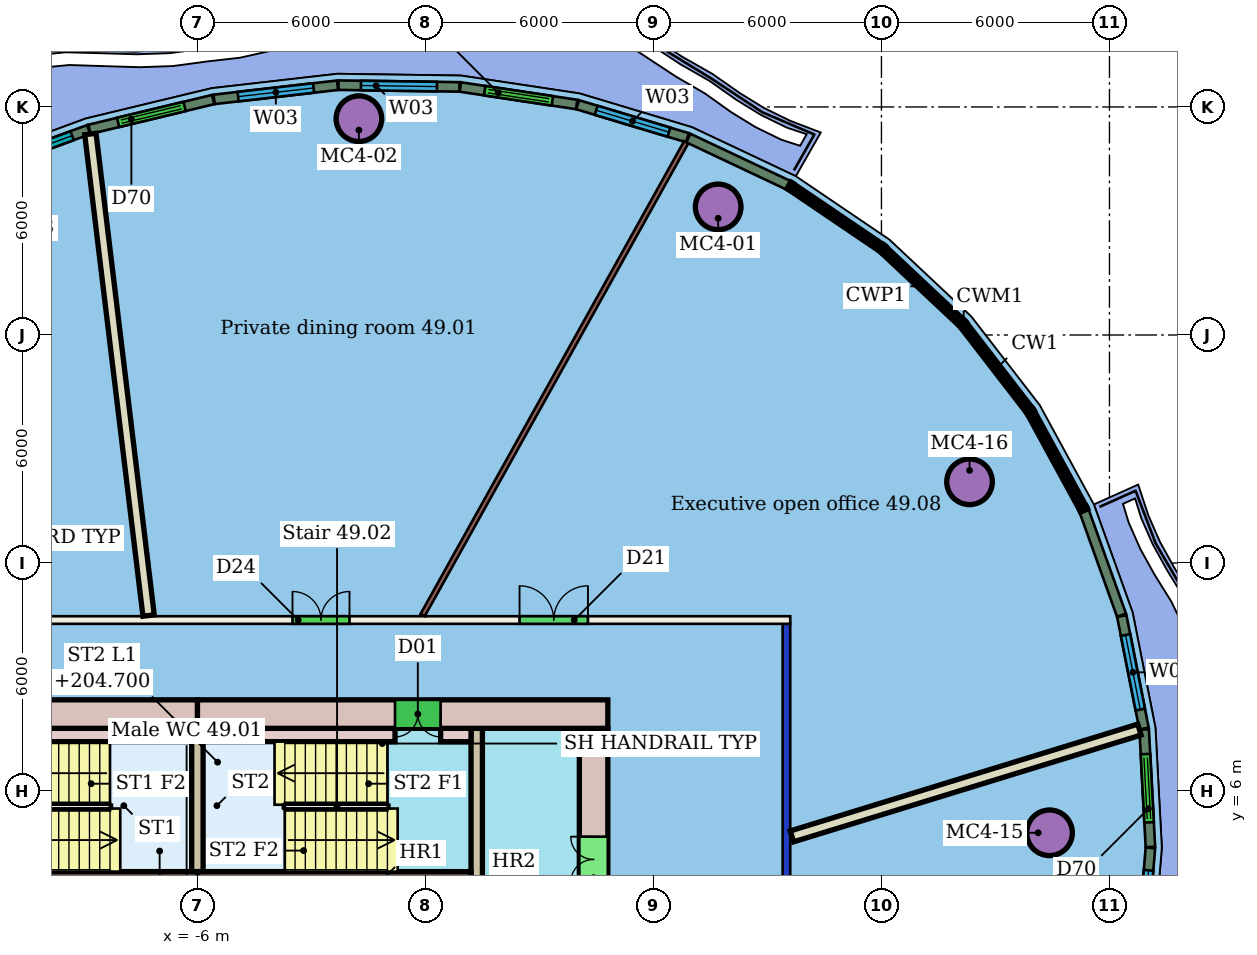
"""IFC4 building model, lengths in metres.
Left out: names, types, materials, properties, quantities, classifications, styles, units other than length and angle.
Written with IfcOpenShell. Run it as: python <this file> out.ifc"""

import sys

from ifc_helpers import new_model, si_unit, direction, frame, frame_2d, origin, origin_2d, place, context, subcontext, project, spatial, rectangle, hollow_circle, extrude, element, fill, save


model = new_model("IFC4")
c1 = context("Model", 3, precision=1e-05, world=origin(), true_north=direction((0.0, 1.0)))
c2 = subcontext(c1, "Body", "Model", "MODEL_VIEW")
j1 = project(units=[si_unit("LENGTHUNIT", "METRE"), si_unit("PLANEANGLEUNIT", "RADIAN")], contexts=[c1])
p1 = place(None, origin())
s1 = spatial("IfcSite", under=j1, at=p1, CompositionType="ELEMENT")
p2 = place(p1, origin())
s2 = spatial("IfcBuilding", under=s1, at=p2, CompositionType="ELEMENT")
p3 = place(p2, frame((0.0, 0.0, 202.9)))
s3 = spatial("IfcBuildingStorey", under=s2, at=p3, CompositionType="ELEMENT", Elevation=202.9)
for number, where, z_axis, x_axis in (
    (1, (7.704, 21.37, 0.0), (0.0, 0.0, 1.0), (1.0, 0.0, 0.0)),
    (2, (-1.75, 23.691, 0.0), (0.0, 0.0, 1.0), (1.0, 0.0, 0.0)),
    (3, (16.424, 4.901, 0.0), (0.0, 0.0, 1.0), (1.0, 0.0, 0.0)),
    (4, (14.318, 14.137, 0.0), (0.0, 0.0, 1.0), (1.0, 0.0, 0.0)),
):
    element("IfcColumn", number, at=place(p3, frame(where, z_axis=z_axis, x_axis=x_axis)), inside=s3, PredefinedType="COLUMN", context=c2, shape_type="SweptSolid", body=[
        extrude(hollow_circle(Radius=0.6, WallThickness=0.045, at=origin_2d()), origin(), (0.0, 0.0, 1.0), 3.45),
    ])
p4 = place(p3, frame((-21.6, 10.5, 0.0), z_axis=(0.0, 0.0, 1.0), x_axis=(1.0, 0.0, 0.0)))
e5 = element("IfcWall", 5, at=p4, inside=s3, PredefinedType="PARTITIONING", context=c2, shape_type="SweptSolid", body=[
    extrude(rectangle(XDim=31.2, YDim=0.2, at=frame_2d((15.6, 0.0))), origin(), (0.0, 0.0, 1.0), 3.45),
])
p5 = place(p4, frame((18.102, 0.0, 0.0)))
e6 = element("IfcOpeningElement", 6, at=p5, cuts=e5, PredefinedType="OPENING", context=c2, shape_type="SweptSolid", body=[
    extrude(rectangle(XDim=1.5, YDim=2.1, at=frame_2d((0.75, 1.05))), frame((0.0, 0.11, 0.0), z_axis=(0.0, -1.0, 0.0), x_axis=(1.0, 0.0, 0.0)), (0.0, 0.0, 1.0), 0.22),
])
p6 = place(p4, frame((8.563, 0.0, 0.0)))
e7 = element("IfcOpeningElement", 7, at=p6, cuts=e5, PredefinedType="OPENING", context=c2, shape_type="SweptSolid", body=[
    extrude(rectangle(XDim=1.8, YDim=2.4, at=frame_2d((0.9, 1.2))), frame((0.0, 0.11, 0.0), z_axis=(0.0, -1.0, 0.0), x_axis=(1.0, 0.0, 0.0)), (0.0, 0.0, 1.0), 0.22),
])
p7 = place(p4, frame((24.077, 0.0, 0.0)))
e8 = element("IfcOpeningElement", 8, at=p7, cuts=e5, PredefinedType="OPENING", context=c2, shape_type="SweptSolid", body=[
    extrude(rectangle(XDim=1.8, YDim=2.1, at=frame_2d((0.9, 1.05))), frame((0.0, 0.11, 0.0), z_axis=(0.0, -1.0, 0.0), x_axis=(1.0, 0.0, 0.0)), (0.0, 0.0, 1.0), 0.22),
])
p8 = place(p3, frame((9.5, 10.4, 0.0), z_axis=(0.0, 0.0, 1.0), x_axis=(0.0, -1.0, 0.0)))
e9 = element("IfcWall", 9, at=p8, inside=s3, PredefinedType="PARTITIONING", context=c2, shape_type="SweptSolid", body=[
    extrude(rectangle(XDim=20.8, YDim=0.2, at=frame_2d((10.4, 0.0))), origin(), (0.0, 0.0, 1.0), 3.05),
])
p9 = place(p8, frame((9.885, 0.0, 0.0)))
e10 = element("IfcOpeningElement", 10, at=p9, cuts=e9, PredefinedType="OPENING", context=c2, shape_type="SweptSolid", body=[
    extrude(rectangle(XDim=1.8, YDim=2.4, at=frame_2d((0.9, 1.2))), frame((0.0, 0.11, 0.0), z_axis=(0.0, -1.0, 0.0), x_axis=(1.0, 0.0, 0.0)), (0.0, 0.0, 1.0), 0.22),
])
p10 = place(p3, frame((6.863, 23.071, 0.0), z_axis=(0.0, 0.0, 1.0), x_axis=(-0.486953657805, -0.873427807635, 0.0)))
e11 = element("IfcWall", 11, at=p10, inside=s3, PredefinedType="PARTITIONING", context=c2, shape_type="SweptSolid", body=[
    extrude(rectangle(XDim=14.243, YDim=0.125, at=frame_2d((7.122, 0.0))), origin(), (0.0, 0.0, 1.0), 3.45),
])
p11 = place(p3, frame((-8.816, 23.289, 0.0), z_axis=(0.0, 0.0, 1.0), x_axis=(0.120069156686, -0.992765530029, 0.0)))
e12 = element("IfcWall", 12, at=p11, inside=s3, PredefinedType="PARTITIONING", context=c2, shape_type="SweptSolid", body=[
    extrude(rectangle(XDim=12.763, YDim=0.3, at=frame_2d((6.382, 0.0))), origin(), (0.0, 0.0, 1.0), 3.45),
])
p12 = place(p3, frame((18.788, 7.617, 0.0), z_axis=(0.0, 0.0, 1.0), x_axis=(-0.955883790435, -0.293745092188, 0.0)))
e13 = element("IfcWall", 13, at=p12, inside=s3, PredefinedType="PARTITIONING", context=c2, shape_type="SweptSolid", body=[
    extrude(rectangle(XDim=9.566, YDim=0.3, at=frame_2d((4.783, 0.0))), origin(), (0.0, 0.0, 1.0), 3.45),
])
p13 = place(p3, frame((9.549, 21.941, 0.0), z_axis=(0.0, 0.0, 1.0), x_axis=(-0.904371073682, 0.426746952054, 0.0)))
e14 = element("IfcWall", 14, at=p13, inside=s3, PredefinedType="SOLIDWALL", context=c2, shape_type="SweptSolid", body=[
    extrude(rectangle(XDim=2.908, YDim=0.25, at=frame_2d((1.454, 0.0))), origin(), (0.0, 0.0, 1.0), 3.1),
])
p14 = place(p3, frame((6.895, 23.191, 0.0), z_axis=(0.0, 0.0, 1.0), x_axis=(-0.957728205686, 0.287674614859, 0.0)))
e15 = element("IfcWall", 15, at=p14, inside=s3, PredefinedType="SOLIDWALL", context=c2, shape_type="SweptSolid", body=[
    extrude(rectangle(XDim=3.016, YDim=0.25, at=frame_2d((1.508, 0.0))), origin(), (0.0, 0.0, 1.0), 3.1),
])
p15 = place(p14, frame((0.508, 0.0, 0.9)))
e16 = element("IfcOpeningElement", 16, at=p15, cuts=e15, PredefinedType="OPENING", context=c2, shape_type="SweptSolid", body=[
    extrude(rectangle(XDim=2.0, YDim=2.1, at=frame_2d((1.0, 1.05))), frame((0.0, 0.135, 0.0), z_axis=(0.0, -1.0, 0.0), x_axis=(1.0, 0.0, 0.0)), (0.0, 0.0, 1.0), 0.27),
])
p16 = place(p3, frame((3.981, 24.065, 0.0), z_axis=(0.0, 0.0, 1.0), x_axis=(-0.988853480543, 0.148891887014, 0.0)))
e17 = element("IfcWall", 17, at=p16, inside=s3, PredefinedType="SOLIDWALL", context=c2, shape_type="SweptSolid", body=[
    extrude(rectangle(XDim=3.096, YDim=0.25, at=frame_2d((1.548, 0.0))), origin(), (0.0, 0.0, 1.0), 3.1),
])
p17 = place(p16, frame((0.648, 0.0, 0.0)))
e18 = element("IfcOpeningElement", 18, at=p17, cuts=e17, PredefinedType="OPENING", context=c2, shape_type="SweptSolid", body=[
    extrude(rectangle(XDim=1.8, YDim=2.4, at=frame_2d((0.9, 1.2))), frame((0.0, 0.135, 0.0), z_axis=(0.0, -1.0, 0.0), x_axis=(1.0, 0.0, 0.0)), (0.0, 0.0, 1.0), 0.27),
])
p18 = place(p3, frame((0.895, 24.528, 0.0), z_axis=(0.0, 0.0, 1.0), x_axis=(-0.999898209439, 0.014267822551, 0.0)))
e19 = element("IfcWall", 19, at=p18, inside=s3, PredefinedType="SOLIDWALL", context=c2, shape_type="SweptSolid", body=[
    extrude(rectangle(XDim=3.183, YDim=0.25, at=frame_2d((1.591, 0.0))), origin(), (0.0, 0.0, 1.0), 3.1),
])
p19 = place(p18, frame((0.591, 0.0, 0.9)))
e20 = element("IfcOpeningElement", 20, at=p19, cuts=e19, PredefinedType="OPENING", context=c2, shape_type="SweptSolid", body=[
    extrude(rectangle(XDim=2.0, YDim=2.1, at=frame_2d((1.0, 1.05))), frame((0.0, 0.135, 0.0), z_axis=(0.0, -1.0, 0.0), x_axis=(1.0, 0.0, 0.0)), (0.0, 0.0, 1.0), 0.27),
])
p20 = place(p3, frame((-2.312, 24.572, 0.0), z_axis=(0.0, 0.0, 1.0), x_axis=(-0.99349628186, -0.113864559585, 0.0)))
e21 = element("IfcWall", 21, at=p20, inside=s3, PredefinedType="SOLIDWALL", context=c2, shape_type="SweptSolid", body=[
    extrude(rectangle(XDim=3.27, YDim=0.25, at=frame_2d((1.635, 0.0))), origin(), (0.0, 0.0, 1.0), 3.1),
])
p21 = place(p20, frame((0.635, 0.0, 0.9)))
e22 = element("IfcOpeningElement", 22, at=p21, cuts=e21, PredefinedType="OPENING", context=c2, shape_type="SweptSolid", body=[
    extrude(rectangle(XDim=2.0, YDim=2.1, at=frame_2d((1.0, 1.05))), frame((0.0, 0.135, 0.0), z_axis=(0.0, -1.0, 0.0), x_axis=(1.0, 0.0, 0.0)), (0.0, 0.0, 1.0), 0.27),
])
p22 = place(p3, frame((-5.583, 24.196, 0.0), z_axis=(0.0, 0.0, 1.0), x_axis=(-0.972213814668, -0.234094635926, 0.0)))
e23 = element("IfcWall", 23, at=p22, inside=s3, PredefinedType="SOLIDWALL", context=c2, shape_type="SweptSolid", body=[
    extrude(rectangle(XDim=3.352, YDim=0.25, at=frame_2d((1.676, 0.0))), origin(), (0.0, 0.0, 1.0), 3.1),
])
p23 = place(p22, frame((0.776, 0.0, 0.0)))
e24 = element("IfcOpeningElement", 24, at=p23, cuts=e23, PredefinedType="OPENING", context=c2, shape_type="SweptSolid", body=[
    extrude(rectangle(XDim=1.8, YDim=2.4, at=frame_2d((0.9, 1.2))), frame((0.0, 0.135, 0.0), z_axis=(0.0, -1.0, 0.0), x_axis=(1.0, 0.0, 0.0)), (0.0, 0.0, 1.0), 0.27),
])
p24 = place(p3, frame((-8.863, 23.404, 0.0), z_axis=(0.0, 0.0, 1.0), x_axis=(-0.93828100614, -0.345873898288, 0.0)))
e25 = element("IfcWall", 25, at=p24, inside=s3, PredefinedType="SOLIDWALL", context=c2, shape_type="SweptSolid", body=[
    extrude(rectangle(XDim=3.423, YDim=0.25, at=frame_2d((1.712, 0.0))), origin(), (0.0, 0.0, 1.0), 3.1),
])
p25 = place(p24, frame((0.462, 0.0, 0.9)))
e26 = element("IfcOpeningElement", 26, at=p25, cuts=e25, PredefinedType="OPENING", context=c2, shape_type="SweptSolid", body=[
    extrude(rectangle(XDim=1.6, YDim=2.1, at=frame_2d((0.8, 1.05))), frame((0.0, 0.135, 0.0), z_axis=(0.0, -1.0, 0.0), x_axis=(1.0, 0.0, 0.0)), (0.0, 0.0, 1.0), 0.27),
])
p26 = place(p3, frame((18.816, 1.331, 0.0), z_axis=(0.0, 0.0, 1.0), x_axis=(0.082004278311, 0.996631977381, 0.0)))
e27 = element("IfcWall", 27, at=p26, inside=s3, PredefinedType="SOLIDWALL", context=c2, shape_type="SweptSolid", body=[
    extrude(rectangle(XDim=3.183, YDim=0.25, at=frame_2d((1.591, 0.0))), origin(), (0.0, 0.0, 1.0), 3.1),
])
p27 = place(p26, frame((0.591, 0.0, 0.9)))
e28 = element("IfcOpeningElement", 28, at=p27, cuts=e27, PredefinedType="OPENING", context=c2, shape_type="SweptSolid", body=[
    extrude(rectangle(XDim=2.0, YDim=2.1, at=frame_2d((1.0, 1.05))), frame((0.0, 0.135, 0.0), z_axis=(0.0, -1.0, 0.0), x_axis=(1.0, 0.0, 0.0)), (0.0, 0.0, 1.0), 0.27),
])
p28 = place(p3, frame((19.078, 4.528, 0.0), z_axis=(0.0, 0.0, 1.0), x_axis=(-0.053150699104, 0.998586502605, 0.0)))
e29 = element("IfcWall", 29, at=p28, inside=s3, PredefinedType="SOLIDWALL", context=c2, shape_type="SweptSolid", body=[
    extrude(rectangle(XDim=3.096, YDim=0.25, at=frame_2d((1.548, 0.0))), origin(), (0.0, 0.0, 1.0), 3.1),
])
p29 = place(p28, frame((0.648, 0.0, 0.0)))
e30 = element("IfcOpeningElement", 30, at=p29, cuts=e29, PredefinedType="OPENING", context=c2, shape_type="SweptSolid", body=[
    extrude(rectangle(XDim=1.8, YDim=2.4, at=frame_2d((0.9, 1.2))), frame((0.0, 0.135, 0.0), z_axis=(0.0, -1.0, 0.0), x_axis=(1.0, 0.0, 0.0)), (0.0, 0.0, 1.0), 0.27),
])
p30 = place(p3, frame((18.91, 7.645, 0.0), z_axis=(0.0, 0.0, 1.0), x_axis=(-0.194200963519, 0.980961765702, 0.0)))
e31 = element("IfcWall", 31, at=p30, inside=s3, PredefinedType="SOLIDWALL", context=c2, shape_type="SweptSolid", body=[
    extrude(rectangle(XDim=3.016, YDim=0.25, at=frame_2d((1.508, 0.0))), origin(), (0.0, 0.0, 1.0), 3.1),
])
p31 = place(p30, frame((0.508, 0.0, 0.9)))
e32 = element("IfcOpeningElement", 32, at=p31, cuts=e31, PredefinedType="OPENING", context=c2, shape_type="SweptSolid", body=[
    extrude(rectangle(XDim=2.0, YDim=2.1, at=frame_2d((1.0, 1.05))), frame((0.0, 0.135, 0.0), z_axis=(0.0, -1.0, 0.0), x_axis=(1.0, 0.0, 0.0)), (0.0, 0.0, 1.0), 0.27),
])
p32 = place(p3, frame((18.317, 10.629, 0.0), z_axis=(0.0, 0.0, 1.0), x_axis=(-0.337681671404, 0.941260372478, 0.0)))
e33 = element("IfcWall", 33, at=p32, inside=s3, PredefinedType="SOLIDWALL", context=c2, shape_type="SweptSolid", body=[
    extrude(rectangle(XDim=2.908, YDim=0.25, at=frame_2d((1.454, 0.0))), origin(), (0.0, 0.0, 1.0), 3.1),
])
p33 = place(p3, frame((4.8, 8.025, 0.0), z_axis=(0.0, 0.0, 1.0), x_axis=(-1.0, 0.0, 0.0)))
e34 = element("IfcWall", 34, at=p33, inside=s3, PredefinedType="SHEAR", context=c2, shape_type="SweptSolid", body=[
    extrude(rectangle(XDim=10.8, YDim=0.75, at=frame_2d((5.4, 0.0))), origin(), (0.0, 0.0, 1.0), 3.3),
])
p34 = place(p33, frame((4.4, 0.0, 0.0)))
e35 = element("IfcOpeningElement", 35, at=p34, cuts=e34, PredefinedType="OPENING", context=c2, shape_type="SweptSolid", body=[
    extrude(rectangle(XDim=1.2, YDim=2.1, at=frame_2d((0.6, 1.05))), frame((0.0, 0.385, 0.0), z_axis=(0.0, -1.0, 0.0), x_axis=(1.0, 0.0, 0.0)), (0.0, 0.0, 1.0), 0.77),
])
p35 = place(p3, frame((-6.0, 8.025, 0.0), z_axis=(0.0, 0.0, 1.0), x_axis=(-1.0, 0.0, 0.0)))
e36 = element("IfcWall", 36, at=p35, inside=s3, PredefinedType="SHEAR", context=c2, shape_type="SweptSolid", body=[
    extrude(rectangle(XDim=10.8, YDim=0.75, at=frame_2d((5.4, 0.0))), origin(), (0.0, 0.0, 1.0), 3.3),
])
p36 = place(p35, frame((5.2, 0.0, 0.0)))
e37 = element("IfcOpeningElement", 37, at=p36, cuts=e36, PredefinedType="OPENING", context=c2, shape_type="SweptSolid", body=[
    extrude(rectangle(XDim=1.2, YDim=2.1, at=frame_2d((0.6, 1.05))), frame((0.0, 0.385, 0.0), z_axis=(0.0, -1.0, 0.0), x_axis=(1.0, 0.0, 0.0)), (0.0, 0.0, 1.0), 0.77),
])
p37 = place(p3, frame((4.425, -7.65, 0.0), z_axis=(0.0, 0.0, 1.0), x_axis=(0.0, 1.0, 0.0)))
e38 = element("IfcWall", 38, at=p37, inside=s3, PredefinedType="SHEAR", context=c2, shape_type="SweptSolid", body=[
    extrude(rectangle(XDim=15.3, YDim=0.75, at=frame_2d((7.65, 0.0))), origin(), (0.0, 0.0, 1.0), 3.3),
])
p38 = place(p37, frame((2.85, 0.0, 0.0)))
e39 = element("IfcOpeningElement", 39, at=p38, cuts=e38, PredefinedType="OPENING", context=c2, shape_type="SweptSolid", body=[
    extrude(rectangle(XDim=1.2, YDim=2.1, at=frame_2d((0.6, 1.05))), frame((0.0, 0.385, 0.0), z_axis=(0.0, -1.0, 0.0), x_axis=(1.0, 0.0, 0.0)), (0.0, 0.0, 1.0), 0.77),
])
p39 = place(p37, frame((11.25, 0.0, 0.0)))
e40 = element("IfcOpeningElement", 40, at=p39, cuts=e38, PredefinedType="OPENING", context=c2, shape_type="SweptSolid", body=[
    extrude(rectangle(XDim=1.2, YDim=2.1, at=frame_2d((0.6, 1.05))), frame((0.0, 0.385, 0.0), z_axis=(0.0, -1.0, 0.0), x_axis=(1.0, 0.0, 0.0)), (0.0, 0.0, 1.0), 0.77),
])
for number, where, z_axis, x_axis in (
    (41, (-13.2, 3.655, 0.0), (0.0, 0.0, 1.0), (1.0, 0.0, 0.0)),
    (42, (-6.0, 3.655, 0.0), (0.0, 0.0, 1.0), (1.0, 0.0, 0.0)),
):
    element("IfcWall", number, at=place(p3, frame(where, z_axis=z_axis, x_axis=x_axis)), inside=s3, PredefinedType="SHEAR", context=c2, shape_type="SweptSolid", body=[
        extrude(rectangle(XDim=7.2, YDim=0.45, at=frame_2d((3.6, 0.0))), origin(), (0.0, 0.0, 1.0), 3.3),
    ])
p40 = place(p3, frame((1.35, -7.65, 0.0), z_axis=(0.0, 0.0, 1.0), x_axis=(0.0, 1.0, 0.0)))
e43 = element("IfcWall", 43, at=p40, inside=s3, PredefinedType="SHEAR", context=c2, shape_type="SweptSolid", body=[
    extrude(rectangle(XDim=15.3, YDim=0.3, at=frame_2d((7.65, 0.0))), origin(), (0.0, 0.0, 1.0), 3.3),
])
p41 = place(p40, frame((1.56, 0.0, 0.0)))
e44 = element("IfcOpeningElement", 44, at=p41, cuts=e43, PredefinedType="OPENING", context=c2, shape_type="SweptSolid", body=[
    extrude(rectangle(XDim=1.0, YDim=2.1, at=frame_2d((0.5, 1.05))), frame((0.0, 0.16, 0.0), z_axis=(0.0, -1.0, 0.0), x_axis=(1.0, 0.0, 0.0)), (0.0, 0.0, 1.0), 0.32),
])
p42 = place(p40, frame((6.9, 0.0, 0.0)))
e45 = element("IfcOpeningElement", 45, at=p42, cuts=e43, PredefinedType="OPENING", context=c2, shape_type="SweptSolid", body=[
    extrude(rectangle(XDim=1.5, YDim=2.1, at=frame_2d((0.75, 1.05))), frame((0.0, 0.16, 0.0), z_axis=(0.0, -1.0, 0.0), x_axis=(1.0, 0.0, 0.0)), (0.0, 0.0, 1.0), 0.32),
])
p43 = place(p3, frame((-6.0, 3.88, 0.0), z_axis=(0.0, 0.0, 1.0), x_axis=(0.0, 1.0, 0.0)))
e46 = element("IfcWall", 46, at=p43, inside=s3, PredefinedType="SHEAR", context=c2, shape_type="SweptSolid", body=[
    extrude(rectangle(XDim=3.77, YDim=0.3, at=frame_2d((1.885, 0.0))), origin(), (0.0, 0.0, 1.0), 3.3),
])
for number, where, z_axis, x_axis in (
    (47, (-11.2, 7.475, 0.0), (0.0, 0.0, 1.0), (1.0, 0.0, 0.0)),
    (48, (-5.85, 7.475, 0.0), (0.0, 0.0, 1.0), (1.0, 0.0, 0.0)),
):
    element("IfcWall", number, at=place(p3, frame(where, z_axis=z_axis, x_axis=x_axis)), inside=s3, PredefinedType="SHEAR", context=c2, shape_type="SweptSolid", body=[
        extrude(rectangle(XDim=5.05, YDim=0.35, at=frame_2d((2.525, 0.0))), origin(), (0.0, 0.0, 1.0), 3.3),
    ])
p44 = place(p3, frame((0.4, 7.475, 0.0), z_axis=(0.0, 0.0, 1.0), x_axis=(1.0, 0.0, 0.0)))
e49 = element("IfcWall", 49, at=p44, inside=s3, PredefinedType="SHEAR", context=c2, shape_type="SweptSolid", body=[
    extrude(rectangle(XDim=0.8, YDim=0.35, at=frame_2d((0.4, 0.0))), origin(), (0.0, 0.0, 1.0), 3.3),
])
p45 = place(p5, origin())
e50 = element("IfcDoor", 50, at=p45, inside=s3, OperationType="DOUBLE_DOOR_SINGLE_SWING", PredefinedType="DOOR", context=c2, shape_type="SweptSolid", body=[
    extrude(rectangle(XDim=1.5, YDim=2.1, at=frame_2d((0.75, 1.05))), frame((0.0, 0.025, 0.0), z_axis=(0.0, -1.0, 0.0), x_axis=(1.0, 0.0, 0.0)), (0.0, 0.0, 1.0), 0.05),
])
fill(e6, e50)
p46 = place(p7, origin())
e51 = element("IfcDoor", 51, at=p46, inside=s3, OperationType="DOUBLE_DOOR_SINGLE_SWING", PredefinedType="DOOR", context=c2, shape_type="SweptSolid", body=[
    extrude(rectangle(XDim=1.8, YDim=2.1, at=frame_2d((0.9, 1.05))), frame((0.0, 0.025, 0.0), z_axis=(0.0, -1.0, 0.0), x_axis=(1.0, 0.0, 0.0)), (0.0, 0.0, 1.0), 0.05),
])
fill(e8, e51)
p47 = place(p15, origin())
e52 = element("IfcWindow", 52, at=p47, inside=s3, PartitioningType="SINGLE_PANEL", PredefinedType="WINDOW", context=c2, shape_type="SweptSolid", body=[
    extrude(rectangle(XDim=2.0, YDim=2.1, at=frame_2d((1.0, 1.05))), frame((0.0, 0.03, 0.0), z_axis=(0.0, -1.0, 0.0), x_axis=(1.0, 0.0, 0.0)), (0.0, 0.0, 1.0), 0.06),
])
fill(e16, e52)
p48 = place(p17, origin())
e53 = element("IfcDoor", 53, at=p48, inside=s3, OperationType="DOUBLE_DOOR_SLIDING", PredefinedType="DOOR", context=c2, shape_type="SweptSolid", body=[
    extrude(rectangle(XDim=1.8, YDim=2.4, at=frame_2d((0.9, 1.2))), frame((0.0, 0.025, 0.0), z_axis=(0.0, -1.0, 0.0), x_axis=(1.0, 0.0, 0.0)), (0.0, 0.0, 1.0), 0.05),
])
fill(e18, e53)
p49 = place(p19, origin())
e54 = element("IfcWindow", 54, at=p49, inside=s3, PartitioningType="SINGLE_PANEL", PredefinedType="WINDOW", context=c2, shape_type="SweptSolid", body=[
    extrude(rectangle(XDim=2.0, YDim=2.1, at=frame_2d((1.0, 1.05))), frame((0.0, 0.03, 0.0), z_axis=(0.0, -1.0, 0.0), x_axis=(1.0, 0.0, 0.0)), (0.0, 0.0, 1.0), 0.06),
])
fill(e20, e54)
p50 = place(p21, origin())
e55 = element("IfcWindow", 55, at=p50, inside=s3, PartitioningType="SINGLE_PANEL", PredefinedType="WINDOW", context=c2, shape_type="SweptSolid", body=[
    extrude(rectangle(XDim=2.0, YDim=2.1, at=frame_2d((1.0, 1.05))), frame((0.0, 0.03, 0.0), z_axis=(0.0, -1.0, 0.0), x_axis=(1.0, 0.0, 0.0)), (0.0, 0.0, 1.0), 0.06),
])
fill(e22, e55)
p51 = place(p23, origin())
e56 = element("IfcDoor", 56, at=p51, inside=s3, OperationType="DOUBLE_DOOR_SLIDING", PredefinedType="DOOR", context=c2, shape_type="SweptSolid", body=[
    extrude(rectangle(XDim=1.8, YDim=2.4, at=frame_2d((0.9, 1.2))), frame((0.0, 0.025, 0.0), z_axis=(0.0, -1.0, 0.0), x_axis=(1.0, 0.0, 0.0)), (0.0, 0.0, 1.0), 0.05),
])
fill(e24, e56)
p52 = place(p25, origin())
e57 = element("IfcWindow", 57, at=p52, inside=s3, PartitioningType="SINGLE_PANEL", PredefinedType="WINDOW", context=c2, shape_type="SweptSolid", body=[
    extrude(rectangle(XDim=1.6, YDim=2.1, at=frame_2d((0.8, 1.05))), frame((0.0, 0.03, 0.0), z_axis=(0.0, -1.0, 0.0), x_axis=(1.0, 0.0, 0.0)), (0.0, 0.0, 1.0), 0.06),
])
fill(e26, e57)
p53 = place(p27, origin())
e58 = element("IfcWindow", 58, at=p53, inside=s3, PartitioningType="SINGLE_PANEL", PredefinedType="WINDOW", context=c2, shape_type="SweptSolid", body=[
    extrude(rectangle(XDim=2.0, YDim=2.1, at=frame_2d((1.0, 1.05))), frame((0.0, 0.03, 0.0), z_axis=(0.0, -1.0, 0.0), x_axis=(1.0, 0.0, 0.0)), (0.0, 0.0, 1.0), 0.06),
])
fill(e28, e58)
p54 = place(p29, origin())
e59 = element("IfcDoor", 59, at=p54, inside=s3, OperationType="DOUBLE_DOOR_SLIDING", PredefinedType="DOOR", context=c2, shape_type="SweptSolid", body=[
    extrude(rectangle(XDim=1.8, YDim=2.4, at=frame_2d((0.9, 1.2))), frame((0.0, 0.025, 0.0), z_axis=(0.0, -1.0, 0.0), x_axis=(1.0, 0.0, 0.0)), (0.0, 0.0, 1.0), 0.05),
])
fill(e30, e59)
p55 = place(p31, origin())
e60 = element("IfcWindow", 60, at=p55, inside=s3, PartitioningType="SINGLE_PANEL", PredefinedType="WINDOW", context=c2, shape_type="SweptSolid", body=[
    extrude(rectangle(XDim=2.0, YDim=2.1, at=frame_2d((1.0, 1.05))), frame((0.0, 0.03, 0.0), z_axis=(0.0, -1.0, 0.0), x_axis=(1.0, 0.0, 0.0)), (0.0, 0.0, 1.0), 0.06),
])
fill(e32, e60)
p56 = place(p34, origin())
e61 = element("IfcDoor", 61, at=p56, inside=s3, OperationType="DOUBLE_DOOR_SINGLE_SWING", PredefinedType="NOTDEFINED", context=c2, shape_type="SweptSolid", body=[
    extrude(rectangle(XDim=1.2, YDim=2.1, at=frame_2d((0.6, 1.05))), frame((0.0, 0.025, 0.0), z_axis=(0.0, -1.0, 0.0), x_axis=(1.0, 0.0, 0.0)), (0.0, 0.0, 1.0), 0.05),
])
fill(e35, e61)
p57 = place(p39, origin())
e62 = element("IfcDoor", 62, at=p57, inside=s3, OperationType="DOUBLE_DOOR_SINGLE_SWING", PredefinedType="NOTDEFINED", context=c2, shape_type="SweptSolid", body=[
    extrude(rectangle(XDim=1.2, YDim=2.1, at=frame_2d((0.6, 1.05))), frame((0.0, 0.025, 0.0), z_axis=(0.0, -1.0, 0.0), x_axis=(1.0, 0.0, 0.0)), (0.0, 0.0, 1.0), 0.05),
])
fill(e40, e62)
save(model, sys.argv[1])
